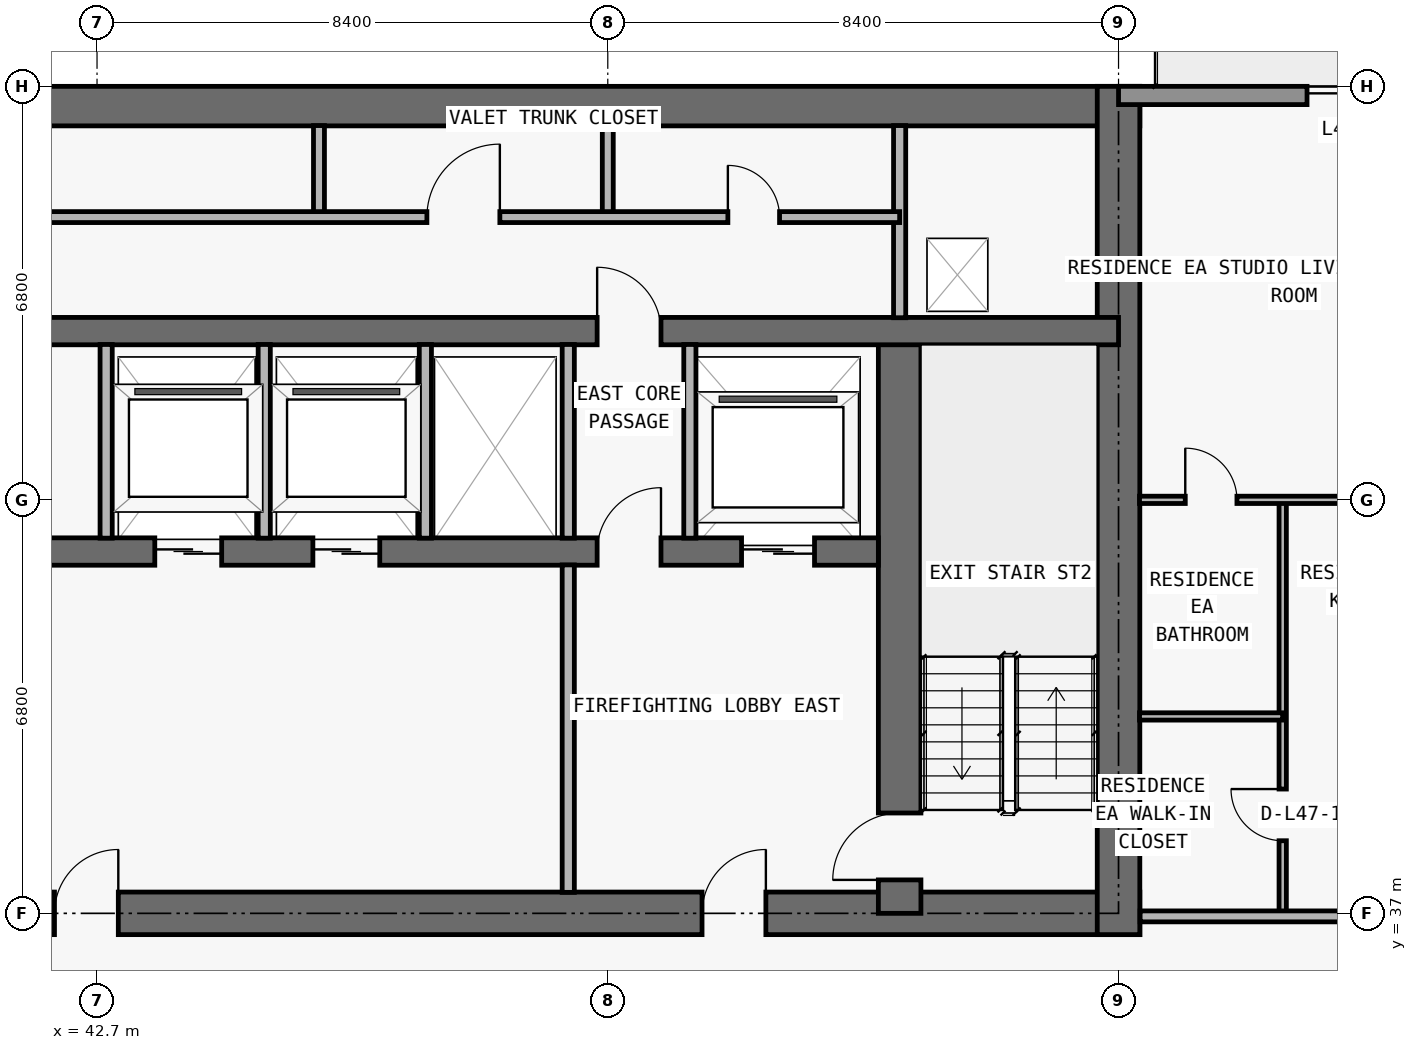
"""IFC4 building model, lengths in metres.
Left out: names, types, materials, properties, quantities, classifications, styles, units other than length and angle.
Written with IfcOpenShell. Run it as: python <this file> out.ifc"""

import sys

from ifc_helpers import new_model, si_unit, direction, frame, frame_2d, origin, place, context, subcontext, project, spatial, rectangle, extrude, element, fill, save


model = new_model("IFC4")
c1 = context("Model", 3, precision=1e-05, world=origin(), true_north=direction((0.0, 1.0)))
c2 = subcontext(c1, "Body", "Model", "MODEL_VIEW")
j1 = project(units=[si_unit("LENGTHUNIT", "METRE"), si_unit("PLANEANGLEUNIT", "RADIAN")], contexts=[c1])
p1 = place(None, origin())
s1 = spatial("IfcSite", under=j1, at=p1, CompositionType="ELEMENT")
p2 = place(p1, origin())
s2 = spatial("IfcBuilding", under=s1, at=p2, CompositionType="ELEMENT")
p3 = place(p2, frame((0.0, 0.0, 170.4)))
s3 = spatial("IfcBuildingStorey", under=s2, at=p3, CompositionType="ELEMENT", Elevation=170.4)
p4 = place(p3, frame((17.95, 37.0, 0.0), z_axis=(0.0, 0.0, 1.0), x_axis=(1.0, 0.0, 0.0)))
e1 = element("IfcWall", 1, at=p4, inside=s3, PredefinedType="SHEAR", context=c2, shape_type="SweptSolid", body=[
    extrude(rectangle(XDim=41.9, YDim=0.7, at=frame_2d((20.95, 0.0))), origin(), (0.0, 0.0, 1.0), 3.05),
])
p5 = place(p4, frame((14.35, 0.0, 0.0)))
e2 = element("IfcOpeningElement", 2, at=p5, cuts=e1, PredefinedType="OPENING", context=c2, shape_type="SweptSolid", body=[
    extrude(rectangle(XDim=1.1, YDim=2.15, at=frame_2d((0.55, 1.075))), frame((0.0, 0.36, 0.0), z_axis=(0.0, -1.0, 0.0), x_axis=(1.0, 0.0, 0.0)), (0.0, 0.0, 1.0), 0.72),
])
p6 = place(p4, frame((6.2, 0.0, 0.0)))
e3 = element("IfcOpeningElement", 3, at=p6, cuts=e1, PredefinedType="OPENING", context=c2, shape_type="SweptSolid", body=[
    extrude(rectangle(XDim=1.05, YDim=2.15, at=frame_2d((0.525, 1.075))), frame((0.0, 0.36, 0.0), z_axis=(0.0, -1.0, 0.0), x_axis=(1.0, 0.0, 0.0)), (0.0, 0.0, 1.0), 0.72),
])
p7 = place(p4, frame((34.7, 0.0, 0.0)))
e4 = element("IfcOpeningElement", 4, at=p7, cuts=e1, PredefinedType="OPENING", context=c2, shape_type="SweptSolid", body=[
    extrude(rectangle(XDim=1.05, YDim=2.15, at=frame_2d((0.525, 1.075))), frame((0.0, 0.36, 0.0), z_axis=(0.0, -1.0, 0.0), x_axis=(1.0, 0.0, 0.0)), (0.0, 0.0, 1.0), 0.72),
])
p8 = place(p4, frame((10.812, 0.0, 0.0)))
e5 = element("IfcOpeningElement", 5, at=p8, cuts=e1, PredefinedType="OPENING", context=c2, shape_type="SweptSolid", body=[
    extrude(rectangle(XDim=1.05, YDim=2.15, at=frame_2d((0.525, 1.075))), frame((0.0, 0.36, 0.0), z_axis=(0.0, -1.0, 0.0), x_axis=(1.0, 0.0, 0.0)), (0.0, 0.0, 1.0), 0.72),
])
p9 = place(p4, frame((24.05, 0.0, 0.0)))
e6 = element("IfcOpeningElement", 6, at=p9, cuts=e1, PredefinedType="OPENING", context=c2, shape_type="SweptSolid", body=[
    extrude(rectangle(XDim=1.05, YDim=2.15, at=frame_2d((0.525, 1.075))), frame((0.0, 0.36, 0.0), z_axis=(0.0, -1.0, 0.0), x_axis=(1.0, 0.0, 0.0)), (0.0, 0.0, 1.0), 0.72),
])
p10 = place(p3, frame((17.95, 50.275, 0.0), z_axis=(0.0, 0.0, 1.0), x_axis=(1.0, 0.0, 0.0)))
e7 = element("IfcWall", 7, at=p10, inside=s3, PredefinedType="SHEAR", context=c2, shape_type="SweptSolid", body=[
    extrude(rectangle(XDim=41.9, YDim=0.65, at=frame_2d((20.95, 0.0))), origin(), (0.0, 0.0, 1.0), 3.05),
])
p11 = place(p3, frame((59.5, 36.65, 0.0), z_axis=(0.0, 0.0, 1.0), x_axis=(0.0, 1.0, 0.0)))
e8 = element("IfcWall", 8, at=p11, inside=s3, PredefinedType="SHEAR", context=c2, shape_type="SweptSolid", body=[
    extrude(rectangle(XDim=13.95, YDim=0.7, at=frame_2d((6.975, 0.0))), origin(), (0.0, 0.0, 1.0), 3.05),
])
p12 = place(p3, frame((55.9, 37.0, 0.0), z_axis=(0.0, 0.0, 1.0), x_axis=(0.0, 1.0, 0.0)))
e9 = element("IfcWall", 9, at=p12, inside=s3, PredefinedType="SHEAR", context=c2, shape_type="SweptSolid", body=[
    extrude(rectangle(XDim=9.575, YDim=0.7, at=frame_2d((4.788, 0.0))), origin(), (0.0, 0.0, 1.0), 3.05),
])
p13 = place(p12, frame((0.55, 0.0, 0.0)))
e10 = element("IfcOpeningElement", 10, at=p13, cuts=e9, PredefinedType="OPENING", context=c2, shape_type="SweptSolid", body=[
    extrude(rectangle(XDim=1.1, YDim=2.15, at=frame_2d((0.55, 1.075))), frame((0.0, 0.36, 0.0), z_axis=(0.0, -1.0, 0.0), x_axis=(1.0, 0.0, 0.0)), (0.0, 0.0, 1.0), 0.72),
])
p14 = place(p3, frame((22.25, 42.95, 0.0), z_axis=(0.0, 0.0, 1.0), x_axis=(1.0, 0.0, 0.0)))
e11 = element("IfcWall", 11, at=p14, inside=s3, PredefinedType="SHEAR", context=c2, shape_type="SweptSolid", body=[
    extrude(rectangle(XDim=33.3, YDim=0.45, at=frame_2d((16.65, 0.0))), origin(), (0.0, 0.0, 1.0), 3.05),
])
p15 = place(p14, frame((1.05, 0.0, 0.0)))
e12 = element("IfcOpeningElement", 12, at=p15, cuts=e11, PredefinedType="OPENING", context=c2, shape_type="SweptSolid", body=[
    extrude(rectangle(XDim=1.2, YDim=2.2, at=frame_2d((0.6, 1.1))), frame((0.0, 0.235, 0.0), z_axis=(0.0, -1.0, 0.0), x_axis=(1.0, 0.0, 0.0)), (0.0, 0.0, 1.0), 0.47),
])
p16 = place(p14, frame((31.05, 0.0, 0.0)))
e13 = element("IfcOpeningElement", 13, at=p16, cuts=e11, PredefinedType="OPENING", context=c2, shape_type="SweptSolid", body=[
    extrude(rectangle(XDim=1.2, YDim=2.2, at=frame_2d((0.6, 1.1))), frame((0.0, 0.235, 0.0), z_axis=(0.0, -1.0, 0.0), x_axis=(1.0, 0.0, 0.0)), (0.0, 0.0, 1.0), 0.47),
])
p17 = place(p14, frame((21.4, 0.0, 0.0)))
e14 = element("IfcOpeningElement", 14, at=p17, cuts=e11, PredefinedType="OPENING", context=c2, shape_type="SweptSolid", body=[
    extrude(rectangle(XDim=1.1, YDim=2.2, at=frame_2d((0.55, 1.1))), frame((0.0, 0.235, 0.0), z_axis=(0.0, -1.0, 0.0), x_axis=(1.0, 0.0, 0.0)), (0.0, 0.0, 1.0), 0.47),
])
p18 = place(p14, frame((24.0, 0.0, 0.0)))
e15 = element("IfcOpeningElement", 15, at=p18, cuts=e11, PredefinedType="OPENING", context=c2, shape_type="SweptSolid", body=[
    extrude(rectangle(XDim=1.1, YDim=2.2, at=frame_2d((0.55, 1.1))), frame((0.0, 0.235, 0.0), z_axis=(0.0, -1.0, 0.0), x_axis=(1.0, 0.0, 0.0)), (0.0, 0.0, 1.0), 0.47),
])
p19 = place(p14, frame((3.625, 0.0, 0.0)))
e16 = element("IfcOpeningElement", 16, at=p19, cuts=e11, PredefinedType="OPENING", context=c2, shape_type="SweptSolid", body=[
    extrude(rectangle(XDim=1.05, YDim=2.15, at=frame_2d((0.525, 1.075))), frame((0.0, 0.235, 0.0), z_axis=(0.0, -1.0, 0.0), x_axis=(1.0, 0.0, 0.0)), (0.0, 0.0, 1.0), 0.47),
])
p20 = place(p14, frame((28.675, 0.0, 0.0)))
e17 = element("IfcOpeningElement", 17, at=p20, cuts=e11, PredefinedType="OPENING", context=c2, shape_type="SweptSolid", body=[
    extrude(rectangle(XDim=1.05, YDim=2.15, at=frame_2d((0.525, 1.075))), frame((0.0, 0.235, 0.0), z_axis=(0.0, -1.0, 0.0), x_axis=(1.0, 0.0, 0.0)), (0.0, 0.0, 1.0), 0.47),
])
p21 = place(p14, frame((15.975, 0.0, 0.0)))
e18 = element("IfcOpeningElement", 18, at=p21, cuts=e11, PredefinedType="OPENING", context=c2, shape_type="SweptSolid", body=[
    extrude(rectangle(XDim=1.0, YDim=2.2, at=frame_2d((0.5, 1.1))), frame((0.0, 0.235, 0.0), z_axis=(0.0, -1.0, 0.0), x_axis=(1.0, 0.0, 0.0)), (0.0, 0.0, 1.0), 0.47),
])
p22 = place(p3, frame((18.3, 46.575, 0.0), z_axis=(0.0, 0.0, 1.0), x_axis=(1.0, 0.0, 0.0)))
e19 = element("IfcWall", 19, at=p22, inside=s3, PredefinedType="SHEAR", context=c2, shape_type="SweptSolid", body=[
    extrude(rectangle(XDim=41.2, YDim=0.45, at=frame_2d((20.6, 0.0))), origin(), (0.0, 0.0, 1.0), 3.05),
])
p23 = place(p22, frame((7.575, 0.0, 0.0)))
e20 = element("IfcOpeningElement", 20, at=p23, cuts=e19, PredefinedType="OPENING", context=c2, shape_type="SweptSolid", body=[
    extrude(rectangle(XDim=1.05, YDim=2.15, at=frame_2d((0.525, 1.075))), frame((0.0, 0.235, 0.0), z_axis=(0.0, -1.0, 0.0), x_axis=(1.0, 0.0, 0.0)), (0.0, 0.0, 1.0), 0.47),
])
p24 = place(p22, frame((32.625, 0.0, 0.0)))
e21 = element("IfcOpeningElement", 21, at=p24, cuts=e19, PredefinedType="OPENING", context=c2, shape_type="SweptSolid", body=[
    extrude(rectangle(XDim=1.05, YDim=2.15, at=frame_2d((0.525, 1.075))), frame((0.0, 0.235, 0.0), z_axis=(0.0, -1.0, 0.0), x_axis=(1.0, 0.0, 0.0)), (0.0, 0.0, 1.0), 0.47),
])
p25 = place(p3, frame((59.5, 50.45, 0.0), z_axis=(0.0, 0.0, 1.0), x_axis=(1.0, 0.0, 0.0)))
e22 = element("IfcWall", 22, at=p25, inside=s3, PredefinedType="STANDARD", context=c2, shape_type="SweptSolid", body=[
    extrude(rectangle(XDim=8.2, YDim=0.3, at=frame_2d((4.1, 0.0))), origin(), (0.0, 0.0, 1.0), 3.05),
])
p26 = place(p25, frame((3.1, 0.0, 0.0)))
e23 = element("IfcOpeningElement", 23, at=p26, cuts=e22, PredefinedType="OPENING", context=c2, shape_type="SweptSolid", body=[
    extrude(rectangle(XDim=2.0, YDim=2.3, at=frame_2d((1.0, 1.15))), frame((0.0, 0.16, 0.0), z_axis=(0.0, -1.0, 0.0), x_axis=(1.0, 0.0, 0.0)), (0.0, 0.0, 1.0), 0.32),
])
for number, where, z_axis, x_axis in (
    (24, (42.85, 43.17, 0.0), (0.0, 0.0, 1.0), (0.0, 1.0, 0.0)),
    (25, (45.45, 43.17, 0.0), (0.0, 0.0, 1.0), (0.0, 1.0, 0.0)),
):
    element("IfcWall", number, at=place(p3, frame(where, z_axis=z_axis, x_axis=x_axis)), inside=s3, PredefinedType="PARTITIONING", context=c2, shape_type="SweptSolid", body=[
        extrude(rectangle(XDim=3.185, YDim=0.2, at=frame_2d((1.593, 0.0))), origin(), (0.0, 0.0, 1.0), 3.05),
    ])
p27 = place(p3, frame((46.35, 48.45, 0.0), z_axis=(0.0, 0.0, 1.0), x_axis=(0.0, 1.0, 0.0)))
e26 = element("IfcWall", 26, at=p27, inside=s3, PredefinedType="PARTITIONING", context=c2, shape_type="SweptSolid", body=[
    extrude(rectangle(XDim=1.505, YDim=0.18, at=frame_2d((0.752, 0.0))), origin(), (0.0, 0.0, 1.0), 3.05),
])
p28 = place(p3, frame((48.1, 43.17, 0.0), z_axis=(0.0, 0.0, 1.0), x_axis=(0.0, 1.0, 0.0)))
e27 = element("IfcWall", 27, at=p28, inside=s3, PredefinedType="PARTITIONING", context=c2, shape_type="SweptSolid", body=[
    extrude(rectangle(XDim=3.185, YDim=0.2, at=frame_2d((1.593, 0.0))), origin(), (0.0, 0.0, 1.0), 3.05),
])
p29 = place(p3, frame((50.45, 37.345, 0.0), z_axis=(0.0, 0.0, 1.0), x_axis=(0.0, 1.0, 0.0)))
e28 = element("IfcWall", 28, at=p29, inside=s3, PredefinedType="PARTITIONING", context=c2, shape_type="SweptSolid", body=[
    extrude(rectangle(XDim=5.385, YDim=0.2, at=frame_2d((2.692, 0.0))), origin(), (0.0, 0.0, 1.0), 3.05),
])
p30 = place(p3, frame((50.45, 43.17, 0.0), z_axis=(0.0, 0.0, 1.0), x_axis=(0.0, 1.0, 0.0)))
e29 = element("IfcWall", 29, at=p30, inside=s3, PredefinedType="PARTITIONING", context=c2, shape_type="SweptSolid", body=[
    extrude(rectangle(XDim=3.185, YDim=0.2, at=frame_2d((1.593, 0.0))), origin(), (0.0, 0.0, 1.0), 3.05),
])
p31 = place(p3, frame((51.1, 48.45, 0.0), z_axis=(0.0, 0.0, 1.0), x_axis=(0.0, 1.0, 0.0)))
e30 = element("IfcWall", 30, at=p31, inside=s3, PredefinedType="PARTITIONING", context=c2, shape_type="SweptSolid", body=[
    extrude(rectangle(XDim=1.505, YDim=0.18, at=frame_2d((0.752, 0.0))), origin(), (0.0, 0.0, 1.0), 3.05),
])
p32 = place(p3, frame((52.45, 43.17, 0.0), z_axis=(0.0, 0.0, 1.0), x_axis=(0.0, 1.0, 0.0)))
e31 = element("IfcWall", 31, at=p32, inside=s3, PredefinedType="PARTITIONING", context=c2, shape_type="SweptSolid", body=[
    extrude(rectangle(XDim=3.185, YDim=0.2, at=frame_2d((1.593, 0.0))), origin(), (0.0, 0.0, 1.0), 3.05),
])
p33 = place(p3, frame((55.9, 46.795, 0.0), z_axis=(0.0, 0.0, 1.0), x_axis=(0.0, 1.0, 0.0)))
e32 = element("IfcWall", 32, at=p33, inside=s3, PredefinedType="PARTITIONING", context=c2, shape_type="SweptSolid", body=[
    extrude(rectangle(XDim=3.16, YDim=0.2, at=frame_2d((1.58, 0.0))), origin(), (0.0, 0.0, 1.0), 3.05),
])
p34 = place(p3, frame((62.2, 37.0, 0.0), z_axis=(0.0, 0.0, 1.0), x_axis=(0.0, 1.0, 0.0)))
e33 = element("IfcWall", 33, at=p34, inside=s3, PredefinedType="PARTITIONING", context=c2, shape_type="SweptSolid", body=[
    extrude(rectangle(XDim=6.8, YDim=0.12, at=frame_2d((3.4, 0.0))), origin(), (0.0, 0.0, 1.0), 3.05),
])
p35 = place(p34, frame((1.194, 0.0, 0.0)))
e34 = element("IfcOpeningElement", 34, at=p35, cuts=e33, PredefinedType="OPENING", context=c2, shape_type="SweptSolid", body=[
    extrude(rectangle(XDim=0.85, YDim=2.1, at=frame_2d((0.425, 1.05))), frame((0.0, 0.07, 0.0), z_axis=(0.0, -1.0, 0.0), x_axis=(1.0, 0.0, 0.0)), (0.0, 0.0, 1.0), 0.14),
])
p36 = place(p3, frame((59.855, 36.95, 0.0), z_axis=(0.0, 0.0, 1.0), x_axis=(1.0, 0.0, 0.0)))
e35 = element("IfcWall", 35, at=p36, inside=s3, PredefinedType="PARTITIONING", context=c2, shape_type="SweptSolid", body=[
    extrude(rectangle(XDim=7.845, YDim=0.18, at=frame_2d((3.922, 0.0))), origin(), (0.0, 0.0, 1.0), 3.05),
])
p37 = place(p36, frame((3.385, 0.0, 0.0)))
e36 = element("IfcOpeningElement", 36, at=p37, cuts=e35, PredefinedType="OPENING", context=c2, shape_type="SweptSolid", body=[
    extrude(rectangle(XDim=1.0, YDim=2.2, at=frame_2d((0.5, 1.1))), frame((0.0, 0.1, 0.0), z_axis=(0.0, -1.0, 0.0), x_axis=(1.0, 0.0, 0.0)), (0.0, 0.0, 1.0), 0.2),
])
p38 = place(p3, frame((59.845, 40.238, 0.0), z_axis=(0.0, 0.0, 1.0), x_axis=(1.0, 0.0, 0.0)))
e37 = element("IfcWall", 37, at=p38, inside=s3, PredefinedType="PARTITIONING", context=c2, shape_type="SweptSolid", body=[
    extrude(rectangle(XDim=2.355, YDim=0.12, at=frame_2d((1.177, 0.0))), origin(), (0.0, 0.0, 1.0), 3.05),
])
p39 = place(p3, frame((59.845, 43.8, 0.0), z_axis=(0.0, 0.0, 1.0), x_axis=(1.0, 0.0, 0.0)))
e38 = element("IfcWall", 38, at=p39, inside=s3, PredefinedType="PARTITIONING", context=c2, shape_type="SweptSolid", body=[
    extrude(rectangle(XDim=11.56, YDim=0.12, at=frame_2d((5.78, 0.0))), origin(), (0.0, 0.0, 1.0), 2.418),
])
p40 = place(p39, frame((3.445, 0.0, 0.0)))
e39 = element("IfcOpeningElement", 39, at=p40, cuts=e38, PredefinedType="OPENING", context=c2, shape_type="SweptSolid", body=[
    extrude(rectangle(XDim=0.9, YDim=2.15, at=frame_2d((0.45, 1.075))), frame((0.0, 0.07, 0.0), z_axis=(0.0, -1.0, 0.0), x_axis=(1.0, 0.0, 0.0)), (0.0, 0.0, 1.0), 0.14),
])
p41 = place(p39, frame((0.752, 0.0, 0.0)))
e40 = element("IfcOpeningElement", 40, at=p41, cuts=e38, PredefinedType="OPENING", context=c2, shape_type="SweptSolid", body=[
    extrude(rectangle(XDim=0.85, YDim=2.1, at=frame_2d((0.425, 1.05))), frame((0.0, 0.07, 0.0), z_axis=(0.0, -1.0, 0.0), x_axis=(1.0, 0.0, 0.0)), (0.0, 0.0, 1.0), 0.14),
])
p42 = place(p3, frame((31.4, 48.45, 0.0), z_axis=(0.0, 0.0, 1.0), x_axis=(1.0, 0.0, 0.0)))
e41 = element("IfcWall", 41, at=p42, inside=s3, PredefinedType="PARTITIONING", context=c2, shape_type="SweptSolid", body=[
    extrude(rectangle(XDim=24.5, YDim=0.18, at=frame_2d((12.25, 0.0))), origin(), (0.0, 0.0, 1.0), 3.05),
])
p43 = place(p42, frame((1.775, 0.0, 0.0)))
e42 = element("IfcOpeningElement", 42, at=p43, cuts=e41, PredefinedType="OPENING", context=c2, shape_type="SweptSolid", body=[
    extrude(rectangle(XDim=1.2, YDim=2.2, at=frame_2d((0.6, 1.1))), frame((0.0, 0.1, 0.0), z_axis=(0.0, -1.0, 0.0), x_axis=(1.0, 0.0, 0.0)), (0.0, 0.0, 1.0), 0.2),
])
p44 = place(p42, frame((9.35, 0.0, 0.0)))
e43 = element("IfcOpeningElement", 43, at=p44, cuts=e41, PredefinedType="OPENING", context=c2, shape_type="SweptSolid", body=[
    extrude(rectangle(XDim=1.0, YDim=2.2, at=frame_2d((0.5, 1.1))), frame((0.0, 0.1, 0.0), z_axis=(0.0, -1.0, 0.0), x_axis=(1.0, 0.0, 0.0)), (0.0, 0.0, 1.0), 0.2),
])
p45 = place(p42, frame((16.725, 0.0, 0.0)))
e44 = element("IfcOpeningElement", 44, at=p45, cuts=e41, PredefinedType="OPENING", context=c2, shape_type="SweptSolid", body=[
    extrude(rectangle(XDim=1.2, YDim=2.2, at=frame_2d((0.6, 1.1))), frame((0.0, 0.1, 0.0), z_axis=(0.0, -1.0, 0.0), x_axis=(1.0, 0.0, 0.0)), (0.0, 0.0, 1.0), 0.2),
])
p46 = place(p42, frame((21.675, 0.0, 0.0)))
e45 = element("IfcOpeningElement", 45, at=p46, cuts=e41, PredefinedType="OPENING", context=c2, shape_type="SweptSolid", body=[
    extrude(rectangle(XDim=0.85, YDim=2.1, at=frame_2d((0.425, 1.05))), frame((0.0, 0.1, 0.0), z_axis=(0.0, -1.0, 0.0), x_axis=(1.0, 0.0, 0.0)), (0.0, 0.0, 1.0), 0.2),
])
p47 = place(p26, origin())
e46 = element("IfcDoor", 46, at=p47, inside=s3, OperationType="DOUBLE_DOOR_SLIDING", PredefinedType="DOOR", context=c2, shape_type="SweptSolid", body=[
    extrude(rectangle(XDim=2.0, YDim=2.3, at=frame_2d((1.0, 1.15))), frame((0.0, 0.025, 0.0), z_axis=(0.0, -1.0, 0.0), x_axis=(1.0, 0.0, 0.0)), (0.0, 0.0, 1.0), 0.05),
])
fill(e23, e46)
p48 = place(p16, origin())
e47 = element("IfcDoor", 47, at=p48, inside=s3, OperationType="DOUBLE_DOOR_SLIDING", PredefinedType="DOOR", context=c2, shape_type="SweptSolid", body=[
    extrude(rectangle(XDim=1.2, YDim=2.2, at=frame_2d((0.6, 1.1))), frame((0.0, 0.025, 0.0), z_axis=(0.0, -1.0, 0.0), x_axis=(1.0, 0.0, 0.0)), (0.0, 0.0, 1.0), 0.05),
])
fill(e13, e47)
p49 = place(p17, origin())
e48 = element("IfcDoor", 48, at=p49, inside=s3, OperationType="DOUBLE_DOOR_SLIDING", PredefinedType="DOOR", context=c2, shape_type="SweptSolid", body=[
    extrude(rectangle(XDim=1.1, YDim=2.2, at=frame_2d((0.55, 1.1))), frame((0.0, 0.025, 0.0), z_axis=(0.0, -1.0, 0.0), x_axis=(1.0, 0.0, 0.0)), (0.0, 0.0, 1.0), 0.05),
])
fill(e14, e48)
p50 = place(p18, origin())
e49 = element("IfcDoor", 49, at=p50, inside=s3, OperationType="DOUBLE_DOOR_SLIDING", PredefinedType="DOOR", context=c2, shape_type="SweptSolid", body=[
    extrude(rectangle(XDim=1.1, YDim=2.2, at=frame_2d((0.55, 1.1))), frame((0.0, 0.025, 0.0), z_axis=(0.0, -1.0, 0.0), x_axis=(1.0, 0.0, 0.0)), (0.0, 0.0, 1.0), 0.05),
])
fill(e15, e49)
p51 = place(p7, origin())
e50 = element("IfcDoor", 50, at=p51, inside=s3, OperationType="SINGLE_SWING_RIGHT", PredefinedType="DOOR", context=c2, shape_type="SweptSolid", body=[
    extrude(rectangle(XDim=1.05, YDim=2.15, at=frame_2d((0.525, 1.075))), frame((0.0, 0.025, 0.0), z_axis=(0.0, -1.0, 0.0), x_axis=(1.0, 0.0, 0.0)), (0.0, 0.0, 1.0), 0.05),
])
fill(e4, e50)
p52 = place(p13, origin())
e51 = element("IfcDoor", 51, at=p52, inside=s3, OperationType="SINGLE_SWING_LEFT", PredefinedType="DOOR", context=c2, shape_type="SweptSolid", body=[
    extrude(rectangle(XDim=1.1, YDim=2.15, at=frame_2d((0.55, 1.075))), frame((0.0, 0.025, 0.0), z_axis=(0.0, -1.0, 0.0), x_axis=(1.0, 0.0, 0.0)), (0.0, 0.0, 1.0), 0.05),
])
fill(e10, e51)
p53 = place(p20, origin())
e52 = element("IfcDoor", 52, at=p53, inside=s3, OperationType="SINGLE_SWING_RIGHT", PredefinedType="DOOR", context=c2, shape_type="SweptSolid", body=[
    extrude(rectangle(XDim=1.05, YDim=2.15, at=frame_2d((0.525, 1.075))), frame((0.0, 0.025, 0.0), z_axis=(0.0, -1.0, 0.0), x_axis=(1.0, 0.0, 0.0)), (0.0, 0.0, 1.0), 0.05),
])
fill(e17, e52)
p54 = place(p9, origin())
e53 = element("IfcDoor", 53, at=p54, inside=s3, OperationType="SINGLE_SWING_RIGHT", PredefinedType="DOOR", context=c2, shape_type="SweptSolid", body=[
    extrude(rectangle(XDim=1.05, YDim=2.15, at=frame_2d((0.525, 1.075))), frame((0.0, 0.025, 0.0), z_axis=(0.0, -1.0, 0.0), x_axis=(1.0, 0.0, 0.0)), (0.0, 0.0, 1.0), 0.05),
])
fill(e6, e53)
p55 = place(p24, origin())
e54 = element("IfcDoor", 54, at=p55, inside=s3, OperationType="SINGLE_SWING_LEFT", PredefinedType="DOOR", context=c2, shape_type="SweptSolid", body=[
    extrude(rectangle(XDim=1.05, YDim=2.15, at=frame_2d((0.525, 1.075))), frame((0.0, 0.025, 0.0), z_axis=(0.0, -1.0, 0.0), x_axis=(1.0, 0.0, 0.0)), (0.0, 0.0, 1.0), 0.05),
])
fill(e21, e54)
p56 = place(p45, origin())
e55 = element("IfcDoor", 55, at=p56, inside=s3, OperationType="SINGLE_SWING_RIGHT", PredefinedType="DOOR", context=c2, shape_type="SweptSolid", body=[
    extrude(rectangle(XDim=1.2, YDim=2.2, at=frame_2d((0.6, 1.1))), frame((0.0, 0.025, 0.0), z_axis=(0.0, -1.0, 0.0), x_axis=(1.0, 0.0, 0.0)), (0.0, 0.0, 1.0), 0.05),
])
fill(e44, e55)
p57 = place(p46, origin())
e56 = element("IfcDoor", 56, at=p57, inside=s3, OperationType="SINGLE_SWING_LEFT", PredefinedType="DOOR", context=c2, shape_type="SweptSolid", body=[
    extrude(rectangle(XDim=0.85, YDim=2.1, at=frame_2d((0.425, 1.05))), frame((0.0, 0.025, 0.0), z_axis=(0.0, -1.0, 0.0), x_axis=(1.0, 0.0, 0.0)), (0.0, 0.0, 1.0), 0.05),
])
fill(e45, e56)
p58 = place(p35, origin())
e57 = element("IfcDoor", 57, at=p58, inside=s3, OperationType="SINGLE_SWING_RIGHT", PredefinedType="DOOR", context=c2, shape_type="SweptSolid", body=[
    extrude(rectangle(XDim=0.85, YDim=2.1, at=frame_2d((0.425, 1.05))), frame((0.0, 0.025, 0.0), z_axis=(0.0, -1.0, 0.0), x_axis=(1.0, 0.0, 0.0)), (0.0, 0.0, 1.0), 0.05),
])
fill(e34, e57)
p59 = place(p41, origin())
e58 = element("IfcDoor", 58, at=p59, inside=s3, OperationType="SINGLE_SWING_LEFT", PredefinedType="DOOR", context=c2, shape_type="SweptSolid", body=[
    extrude(rectangle(XDim=0.85, YDim=2.1, at=frame_2d((0.425, 1.05))), frame((0.0, 0.025, 0.0), z_axis=(0.0, -1.0, 0.0), x_axis=(1.0, 0.0, 0.0)), (0.0, 0.0, 1.0), 0.05),
])
fill(e40, e58)
save(model, sys.argv[1])
